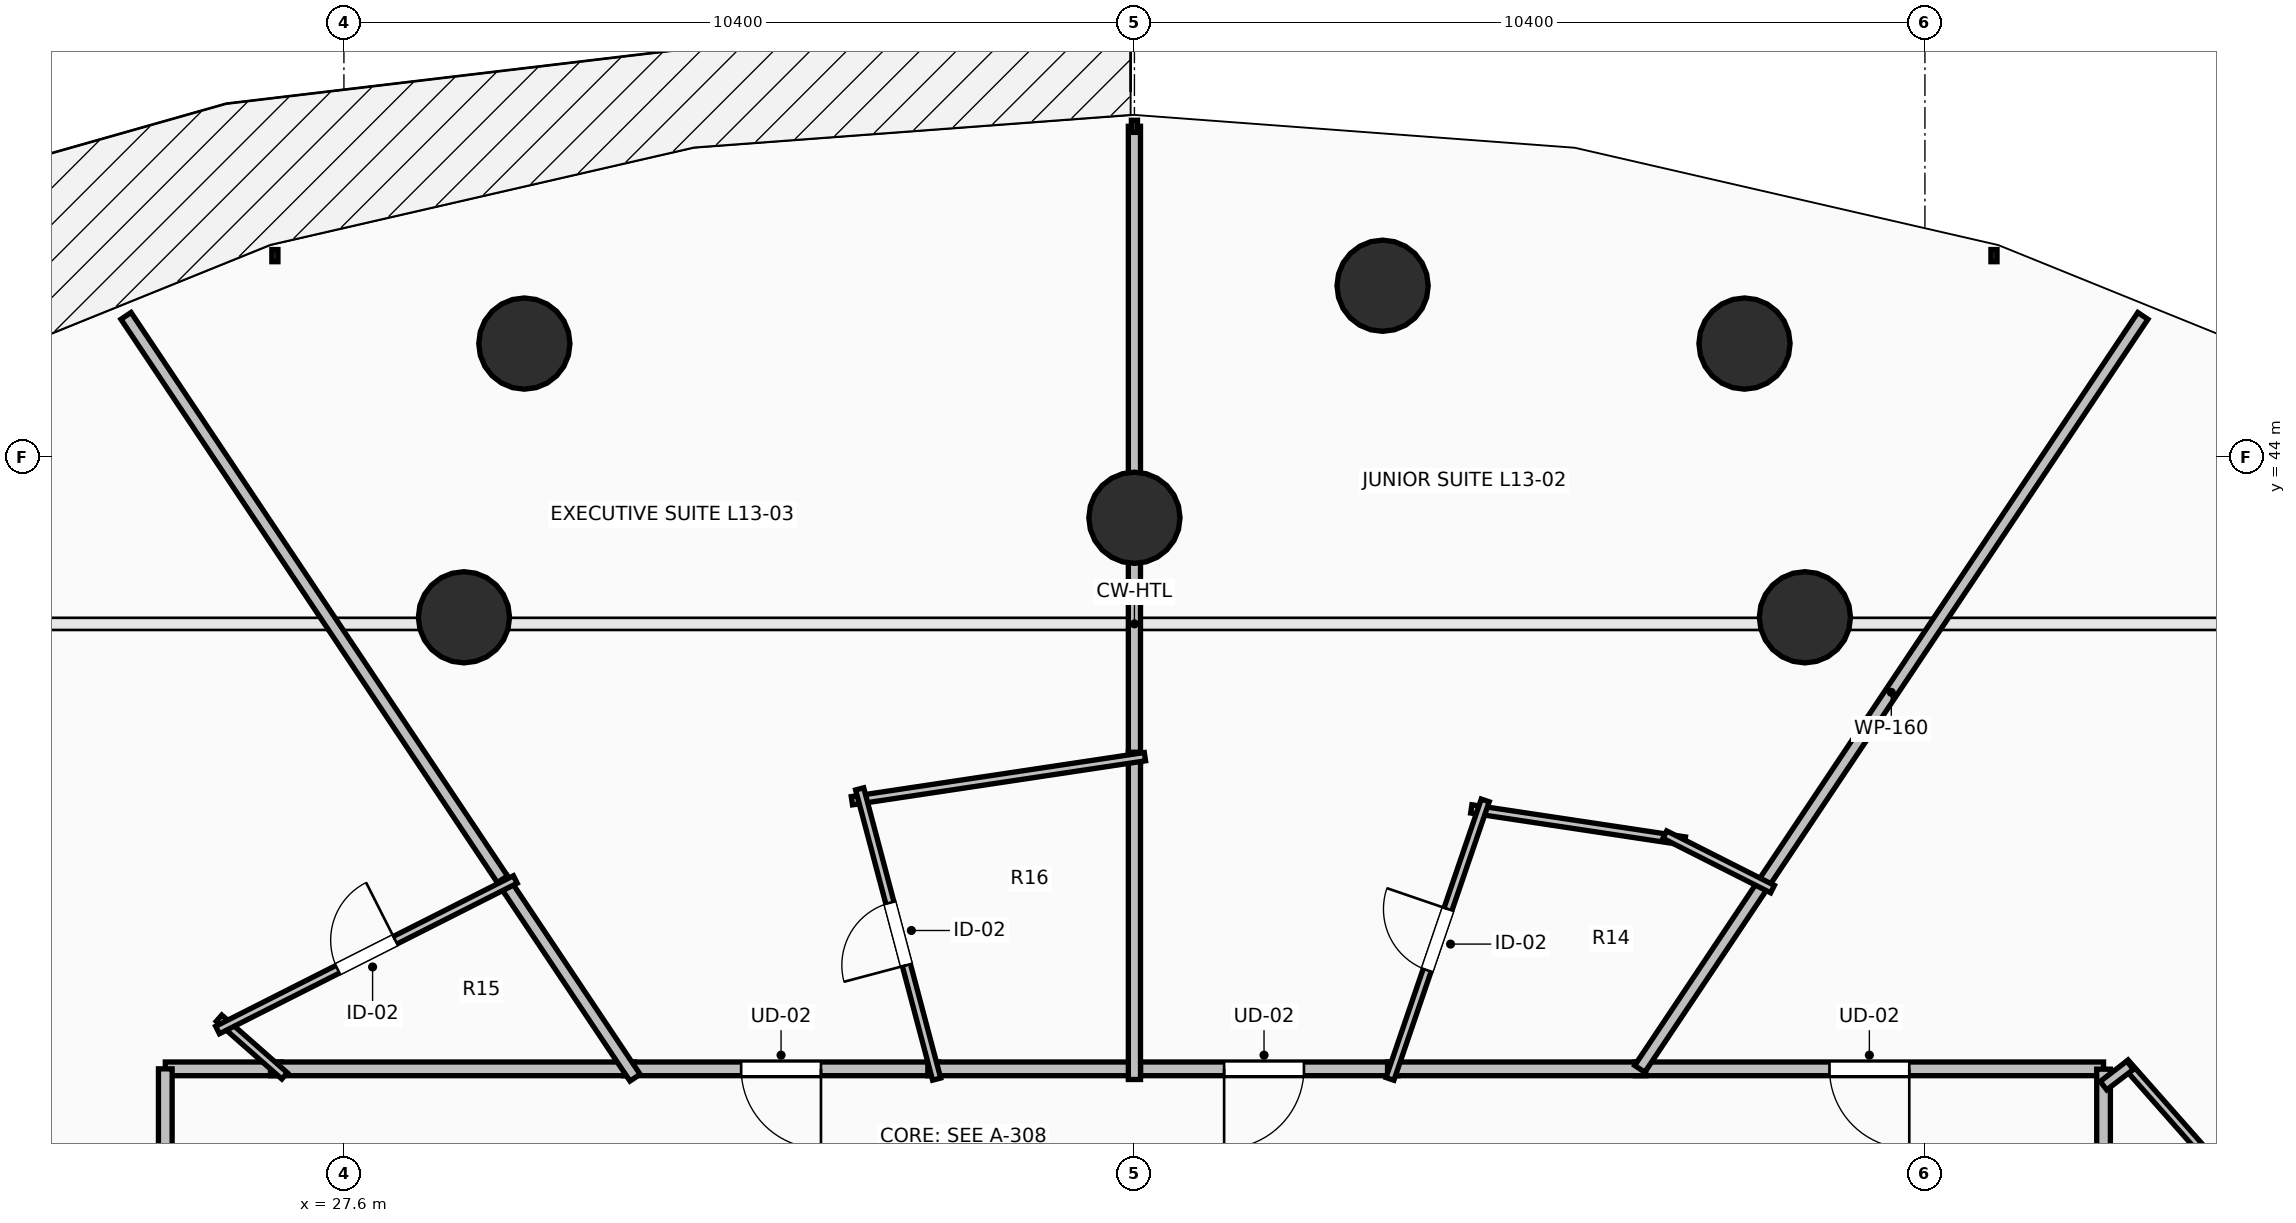
"""IFC4 building model, lengths in metres.
Left out: names, types, materials, properties, quantities, classifications, styles, units other than length and angle.
Written with IfcOpenShell. Run it as: python <this file> out.ifc"""

import sys

from ifc_helpers import new_model, si_unit, direction, frame, frame_2d, origin, origin_2d, place, context, subcontext, project, spatial, rectangle, circle, extrude, element, fill, save


model = new_model("IFC4")
c1 = context("Model", 3, precision=1e-05, world=origin(), true_north=direction((0.0, 1.0)))
c2 = subcontext(c1, "Body", "Model", "MODEL_VIEW")
j1 = project(units=[si_unit("LENGTHUNIT", "METRE"), si_unit("PLANEANGLEUNIT", "RADIAN")], contexts=[c1])
p1 = place(None, origin())
s1 = spatial("IfcSite", under=j1, at=p1, CompositionType="ELEMENT")
p2 = place(p1, origin())
s2 = spatial("IfcBuilding", under=s1, at=p2, CompositionType="ELEMENT")
p3 = place(p2, frame((0.0, 0.0, 52.0)))
s3 = spatial("IfcBuildingStorey", under=s2, at=p3, CompositionType="ELEMENT", Elevation=52.0)
for number, where, z_axis, x_axis in (
    (1, (46.821, 41.891, 0.0), (0.0, 0.0, 1.0), (0.383, 0.924, 0.0)),
    (2, (38.0, 43.2, 0.0), (0.0, 0.0, 1.0), (0.0, 1.0, 0.0)),
    (3, (29.179, 41.891, 0.0), (0.0, 0.0, 1.0), (-0.383, 0.924, 0.0)),
    (4, (46.026, 45.492, 0.0), (0.0, 0.0, 1.0), (0.383, 0.924, 0.0)),
    (5, (41.265, 46.252, 0.0), (0.0, 0.0, 1.0), (0.0, 1.0, 0.0)),
    (6, (29.974, 45.492, 0.0), (0.0, 0.0, 1.0), (-0.383, 0.924, 0.0)),
):
    element("IfcColumn", number, at=place(p3, frame(where, z_axis=z_axis, x_axis=x_axis)), inside=s3, PredefinedType="COLUMN", context=c2, shape_type="SweptSolid", body=[
        extrude(circle(Radius=0.6, at=origin_2d()), origin(), (0.0, 0.0, 1.0), 3.5),
    ])
p4 = place(p3, frame((50.75, 35.95, 0.0), z_axis=(0.0, 0.0, 1.0), x_axis=(-1.0, 0.0, 0.0)))
e7 = element("IfcWall", 7, at=p4, inside=s3, PredefinedType="PARTITIONING", context=c2, shape_type="SweptSolid", body=[
    extrude(rectangle(XDim=6.162, YDim=0.18, at=frame_2d((3.081, 0.0))), origin(), (0.0, 0.0, 1.0), 2.432),
])
p5 = place(p4, frame((2.556, 0.0, 0.0)))
e8 = element("IfcOpeningElement", 8, at=p5, cuts=e7, PredefinedType="OPENING", context=c2, shape_type="SweptSolid", body=[
    extrude(rectangle(XDim=1.05, YDim=2.2, at=frame_2d((0.525, 1.1))), frame((0.0, 0.105, 0.0), z_axis=(0.0, -1.0, 0.0), x_axis=(1.0, 0.0, 0.0)), (0.0, 0.0, 1.0), 0.21),
])
p6 = place(p3, frame((50.75, 31.081, 0.0), z_axis=(0.0, 0.0, 1.0), x_axis=(0.0, 1.0, 0.0)))
e9 = element("IfcWall", 9, at=p6, inside=s3, PredefinedType="PARTITIONING", context=c2, shape_type="SweptSolid", body=[
    extrude(rectangle(XDim=4.865, YDim=0.18, at=frame_2d((2.433, 0.0))), origin(), (0.0, 0.0, 1.0), 2.432),
])
p7 = place(p3, frame((41.47, 35.95, 0.0), z_axis=(0.0, 0.0, 1.0), x_axis=(-1.0, 0.0, 0.0)))
e10 = element("IfcWall", 10, at=p7, inside=s3, PredefinedType="PARTITIONING", context=c2, shape_type="SweptSolid", body=[
    extrude(rectangle(XDim=3.53, YDim=0.18, at=frame_2d((1.765, 0.0))), origin(), (0.0, 0.0, 1.0), 3.24),
])
p8 = place(p7, frame((1.24, 0.0, 0.0)))
e11 = element("IfcOpeningElement", 11, at=p8, cuts=e10, PredefinedType="OPENING", context=c2, shape_type="SweptSolid", body=[
    extrude(rectangle(XDim=1.05, YDim=2.2, at=frame_2d((0.525, 1.1))), frame((0.0, 0.105, 0.0), z_axis=(0.0, -1.0, 0.0), x_axis=(1.0, 0.0, 0.0)), (0.0, 0.0, 1.0), 0.21),
])
p9 = place(p3, frame((44.728, 35.95, 0.0), z_axis=(0.0, 0.0, 1.0), x_axis=(-1.0, 0.0, 0.0)))
e12 = element("IfcWall", 12, at=p9, inside=s3, PredefinedType="PARTITIONING", context=c2, shape_type="SweptSolid", body=[
    extrude(rectangle(XDim=3.398, YDim=0.18, at=frame_2d((1.699, 0.0))), origin(), (0.0, 0.0, 1.0), 3.24),
])
p10 = place(p3, frame((35.422, 35.95, 0.0), z_axis=(0.0, 0.0, 1.0), x_axis=(-1.0, 0.0, 0.0)))
e13 = element("IfcWall", 13, at=p10, inside=s3, PredefinedType="PARTITIONING", context=c2, shape_type="SweptSolid", body=[
    extrude(rectangle(XDim=4.142, YDim=0.18, at=frame_2d((2.071, 0.0))), origin(), (0.0, 0.0, 1.0), 3.24),
])
p11 = place(p10, frame((1.546, 0.0, 0.0)))
e14 = element("IfcOpeningElement", 14, at=p11, cuts=e13, PredefinedType="OPENING", context=c2, shape_type="SweptSolid", body=[
    extrude(rectangle(XDim=1.05, YDim=2.2, at=frame_2d((0.525, 1.1))), frame((0.0, 0.105, 0.0), z_axis=(0.0, -1.0, 0.0), x_axis=(1.0, 0.0, 0.0)), (0.0, 0.0, 1.0), 0.21),
])
p12 = place(p3, frame((38.08, 35.95, 0.0), z_axis=(0.0, 0.0, 1.0), x_axis=(-1.0, 0.0, 0.0)))
e15 = element("IfcWall", 15, at=p12, inside=s3, PredefinedType="PARTITIONING", context=c2, shape_type="SweptSolid", body=[
    extrude(rectangle(XDim=2.798, YDim=0.18, at=frame_2d((1.399, 0.0))), origin(), (0.0, 0.0, 1.0), 3.24),
])
p13 = place(p3, frame((26.774, 35.95, 0.0), z_axis=(0.0, 0.0, 1.0), x_axis=(-1.0, 0.0, 0.0)))
e16 = element("IfcWall", 16, at=p13, inside=s3, PredefinedType="PARTITIONING", context=c2, shape_type="SweptSolid", body=[
    extrude(rectangle(XDim=1.524, YDim=0.18, at=frame_2d((0.762, 0.0))), origin(), (0.0, 0.0, 1.0), 2.886),
])
p14 = place(p3, frame((25.25, 35.95, 0.0), z_axis=(0.0, 0.0, 1.0), x_axis=(0.0, -1.0, 0.0)))
e17 = element("IfcWall", 17, at=p14, inside=s3, PredefinedType="PARTITIONING", context=c2, shape_type="SweptSolid", body=[
    extrude(rectangle(XDim=4.729, YDim=0.18, at=frame_2d((2.365, 0.0))), origin(), (0.0, 0.0, 1.0), 2.432),
])
p15 = place(p14, frame((1.84, 0.0, 0.0)))
e18 = element("IfcOpeningElement", 18, at=p15, cuts=e17, PredefinedType="OPENING", context=c2, shape_type="SweptSolid", body=[
    extrude(rectangle(XDim=1.05, YDim=2.2, at=frame_2d((0.525, 1.1))), frame((0.0, 0.105, 0.0), z_axis=(0.0, -1.0, 0.0), x_axis=(1.0, 0.0, 0.0)), (0.0, 0.0, 1.0), 0.21),
])
p16 = place(p3, frame((31.42, 35.95, 0.0), z_axis=(0.0, 0.0, 1.0), x_axis=(-1.0, 0.0, 0.0)))
e19 = element("IfcWall", 19, at=p16, inside=s3, PredefinedType="PARTITIONING", context=c2, shape_type="SweptSolid", body=[
    extrude(rectangle(XDim=4.786, YDim=0.18, at=frame_2d((2.393, 0.0))), origin(), (0.0, 0.0, 1.0), 2.432),
])
p17 = place(p3, frame((51.031, 36.03, 0.0), z_axis=(0.0, 0.0, 1.0), x_axis=(0.662106207726, -0.749410014405, 0.0)))
e20 = element("IfcWall", 20, at=p17, inside=s3, PredefinedType="PARTITIONING", context=c2, shape_type="SweptSolid", body=[
    extrude(rectangle(XDim=4.665, YDim=0.11, at=frame_2d((2.332, 0.0))), origin(), (0.0, 0.0, 1.0), 2.432),
])
p18 = place(p17, frame((1.907, 0.0, 0.0)))
e21 = element("IfcOpeningElement", 21, at=p18, cuts=e20, PredefinedType="OPENING", context=c2, shape_type="SweptSolid", body=[
    extrude(rectangle(XDim=0.85, YDim=2.1, at=frame_2d((0.425, 1.05))), frame((0.0, 0.07, 0.0), z_axis=(0.0, -1.0, 0.0), x_axis=(1.0, 0.0, 0.0)), (0.0, 0.0, 1.0), 0.14),
])
p19 = place(p3, frame((51.267, 45.856, 0.0), z_axis=(0.0, 0.0, 1.0), x_axis=(-0.55557946655, -0.831463442581, 0.0)))
e22 = element("IfcWall", 22, at=p19, inside=s3, PredefinedType="PARTITIONING", context=c2, shape_type="SweptSolid", body=[
    extrude(rectangle(XDim=11.914, YDim=0.16, at=frame_2d((5.957, 0.0))), origin(), (0.0, 0.0, 1.0), 2.432),
])
p20 = place(p3, frame((42.432, 39.37, 0.0), z_axis=(0.0, 0.0, 1.0), x_axis=(0.988877663763, -0.148731187416, 0.0)))
e23 = element("IfcWall", 23, at=p20, inside=s3, PredefinedType="PARTITIONING", context=c2, shape_type="SweptSolid", body=[
    extrude(rectangle(XDim=2.841, YDim=0.11, at=frame_2d((1.421, 0.0))), origin(), (0.0, 0.0, 1.0), 3.24),
])
p21 = place(p3, frame((44.978, 39.031, 0.0), z_axis=(0.0, 0.0, 1.0), x_axis=(0.892388427115, -0.451268096758, 0.0)))
e24 = element("IfcWall", 24, at=p21, inside=s3, PredefinedType="PARTITIONING", context=c2, shape_type="SweptSolid", body=[
    extrude(rectangle(XDim=1.588, YDim=0.11, at=frame_2d((0.794, 0.0))), origin(), (0.0, 0.0, 1.0), 3.24),
])
p22 = place(p3, frame((41.362, 35.817, 0.0), z_axis=(0.0, 0.0, 1.0), x_axis=(0.323669856167, 0.946170082072, 0.0)))
e25 = element("IfcWall", 25, at=p22, inside=s3, PredefinedType="PARTITIONING", context=c2, shape_type="SweptSolid", body=[
    extrude(rectangle(XDim=3.873, YDim=0.11, at=frame_2d((1.936, 0.0))), origin(), (0.0, 0.0, 1.0), 2.886),
])
p23 = place(p22, frame((1.511, 0.0, 0.0)))
e26 = element("IfcOpeningElement", 26, at=p23, cuts=e25, PredefinedType="OPENING", context=c2, shape_type="SweptSolid", body=[
    extrude(rectangle(XDim=0.85, YDim=2.1, at=frame_2d((0.425, 1.05))), frame((0.0, 0.07, 0.0), z_axis=(0.0, -1.0, 0.0), x_axis=(1.0, 0.0, 0.0)), (0.0, 0.0, 1.0), 0.14),
])
p24 = place(p3, frame((38.0, 48.35, 0.0), z_axis=(0.0, 0.0, 1.0), x_axis=(0.0, -1.0, 0.0)))
e27 = element("IfcWall", 27, at=p24, inside=s3, PredefinedType="PARTITIONING", context=c2, shape_type="SweptSolid", body=[
    extrude(rectangle(XDim=8.375, YDim=0.16, at=frame_2d((4.188, 0.0))), origin(), (0.0, 0.0, 1.0), 2.432),
])
p25 = place(p3, frame((38.0, 40.115, 0.0), z_axis=(0.0, 0.0, 1.0), x_axis=(0.0, -1.0, 0.0)))
e28 = element("IfcWall", 28, at=p25, inside=s3, PredefinedType="PARTITIONING", context=c2, shape_type="SweptSolid", body=[
    extrude(rectangle(XDim=4.305, YDim=0.16, at=frame_2d((2.152, 0.0))), origin(), (0.0, 0.0, 1.0), 2.886),
])
p26 = place(p3, frame((34.283, 39.477, 0.0), z_axis=(0.0, 0.0, 1.0), x_axis=(0.988889916837, 0.148649696864, 0.0)))
e29 = element("IfcWall", 29, at=p26, inside=s3, PredefinedType="PARTITIONING", context=c2, shape_type="SweptSolid", body=[
    extrude(rectangle(XDim=3.899, YDim=0.11, at=frame_2d((1.949, 0.0))), origin(), (0.0, 0.0, 1.0), 2.432),
])
p27 = place(p3, frame((35.398, 35.815, 0.0), z_axis=(0.0, 0.0, 1.0), x_axis=(-0.256396995263, 0.966571560113, 0.0)))
e30 = element("IfcWall", 30, at=p27, inside=s3, PredefinedType="PARTITIONING", context=c2, shape_type="SweptSolid", body=[
    extrude(rectangle(XDim=3.951, YDim=0.11, at=frame_2d((1.975, 0.0))), origin(), (0.0, 0.0, 1.0), 2.432),
])
p28 = place(p27, frame((1.55, 0.0, 0.0)))
e31 = element("IfcOpeningElement", 31, at=p28, cuts=e30, PredefinedType="OPENING", context=c2, shape_type="SweptSolid", body=[
    extrude(rectangle(XDim=0.85, YDim=2.1, at=frame_2d((0.425, 1.05))), frame((0.0, 0.07, 0.0), z_axis=(0.0, -1.0, 0.0), x_axis=(1.0, 0.0, 0.0)), (0.0, 0.0, 1.0), 0.14),
])
p29 = place(p3, frame((24.733, 45.856, 0.0), z_axis=(0.0, 0.0, 1.0), x_axis=(0.555564858458, -0.831473203444, 0.0)))
e32 = element("IfcWall", 32, at=p29, inside=s3, PredefinedType="PARTITIONING", context=c2, shape_type="SweptSolid", body=[
    extrude(rectangle(XDim=9.054, YDim=0.16, at=frame_2d((4.527, 0.0))), origin(), (0.0, 0.0, 1.0), 2.432),
])
p30 = place(p3, frame((29.685, 38.444, 0.0), z_axis=(0.0, 0.0, 1.0), x_axis=(0.555596981897, -0.831451738652, 0.0)))
e33 = element("IfcWall", 33, at=p30, inside=s3, PredefinedType="PARTITIONING", context=c2, shape_type="SweptSolid", body=[
    extrude(rectangle(XDim=3.14, YDim=0.16, at=frame_2d((1.57, 0.0))), origin(), (0.0, 0.0, 1.0), 2.432),
])
p31 = place(p3, frame((26.819, 35.857, 0.0), z_axis=(0.0, 0.0, 1.0), x_axis=(-0.750624975639, 0.660728496394, 0.0)))
e34 = element("IfcWall", 34, at=p31, inside=s3, PredefinedType="PARTITIONING", context=c2, shape_type="SweptSolid", body=[
    extrude(rectangle(XDim=1.149, YDim=0.11, at=frame_2d((0.574, 0.0))), origin(), (0.0, 0.0, 1.0), 2.886),
])
p32 = place(p3, frame((25.937, 36.461, 0.0), z_axis=(0.0, 0.0, 1.0), x_axis=(0.892461080662, 0.451124394711, 0.0)))
e35 = element("IfcWall", 35, at=p32, inside=s3, PredefinedType="PARTITIONING", context=c2, shape_type="SweptSolid", body=[
    extrude(rectangle(XDim=4.39, YDim=0.11, at=frame_2d((2.195, 0.0))), origin(), (0.0, 0.0, 1.0), 2.432),
])
p33 = place(p32, frame((1.77, 0.0, 0.0)))
e36 = element("IfcOpeningElement", 36, at=p33, cuts=e35, PredefinedType="OPENING", context=c2, shape_type="SweptSolid", body=[
    extrude(rectangle(XDim=0.85, YDim=2.1, at=frame_2d((0.425, 1.05))), frame((0.0, 0.07, 0.0), z_axis=(0.0, -1.0, 0.0), x_axis=(1.0, 0.0, 0.0)), (0.0, 0.0, 1.0), 0.14),
])
p34 = place(p3, frame((51.099, 35.997, 0.0), z_axis=(0.0, 0.0, 1.0), x_axis=(-0.794185002189, -0.607676050456, 0.0)))
e37 = element("IfcWall", 37, at=p34, inside=s3, PredefinedType="PARTITIONING", context=c2, shape_type="SweptSolid", body=[
    extrude(rectangle(XDim=0.441, YDim=0.14, at=frame_2d((0.221, 0.0))), origin(), (0.0, 0.0, 1.0), 2.886),
])
p35 = place(p5, origin())
e38 = element("IfcDoor", 38, at=p35, inside=s3, OperationType="SINGLE_SWING_LEFT", PredefinedType="DOOR", context=c2, shape_type="SweptSolid", body=[
    extrude(rectangle(XDim=1.05, YDim=2.2, at=frame_2d((0.525, 1.1))), frame((0.0, 0.025, 0.0), z_axis=(0.0, -1.0, 0.0), x_axis=(1.0, 0.0, 0.0)), (0.0, 0.0, 1.0), 0.05),
])
fill(e8, e38)
p36 = place(p8, origin())
e39 = element("IfcDoor", 39, at=p36, inside=s3, OperationType="SINGLE_SWING_RIGHT", PredefinedType="DOOR", context=c2, shape_type="SweptSolid", body=[
    extrude(rectangle(XDim=1.05, YDim=2.2, at=frame_2d((0.525, 1.1))), frame((0.0, 0.025, 0.0), z_axis=(0.0, -1.0, 0.0), x_axis=(1.0, 0.0, 0.0)), (0.0, 0.0, 1.0), 0.05),
])
fill(e11, e39)
p37 = place(p11, origin())
e40 = element("IfcDoor", 40, at=p37, inside=s3, OperationType="SINGLE_SWING_LEFT", PredefinedType="DOOR", context=c2, shape_type="SweptSolid", body=[
    extrude(rectangle(XDim=1.05, YDim=2.2, at=frame_2d((0.525, 1.1))), frame((0.0, 0.025, 0.0), z_axis=(0.0, -1.0, 0.0), x_axis=(1.0, 0.0, 0.0)), (0.0, 0.0, 1.0), 0.05),
])
fill(e14, e40)
p38 = place(p23, origin())
e41 = element("IfcDoor", 41, at=p38, inside=s3, OperationType="SINGLE_SWING_RIGHT", PredefinedType="DOOR", context=c2, shape_type="SweptSolid", body=[
    extrude(rectangle(XDim=0.85, YDim=2.1, at=frame_2d((0.425, 1.05))), frame((0.0, 0.025, 0.0), z_axis=(0.0, -1.0, 0.0), x_axis=(1.0, 0.0, 0.0)), (0.0, 0.0, 1.0), 0.05),
])
fill(e26, e41)
p39 = place(p28, origin())
e42 = element("IfcDoor", 42, at=p39, inside=s3, OperationType="SINGLE_SWING_LEFT", PredefinedType="DOOR", context=c2, shape_type="SweptSolid", body=[
    extrude(rectangle(XDim=0.85, YDim=2.1, at=frame_2d((0.425, 1.05))), frame((0.0, 0.025, 0.0), z_axis=(0.0, -1.0, 0.0), x_axis=(1.0, 0.0, 0.0)), (0.0, 0.0, 1.0), 0.05),
])
fill(e31, e42)
p40 = place(p33, origin())
e43 = element("IfcDoor", 43, at=p40, inside=s3, OperationType="SINGLE_SWING_RIGHT", PredefinedType="DOOR", context=c2, shape_type="SweptSolid", body=[
    extrude(rectangle(XDim=0.85, YDim=2.1, at=frame_2d((0.425, 1.05))), frame((0.0, 0.025, 0.0), z_axis=(0.0, -1.0, 0.0), x_axis=(1.0, 0.0, 0.0)), (0.0, 0.0, 1.0), 0.05),
])
fill(e36, e43)
save(model, sys.argv[1])
